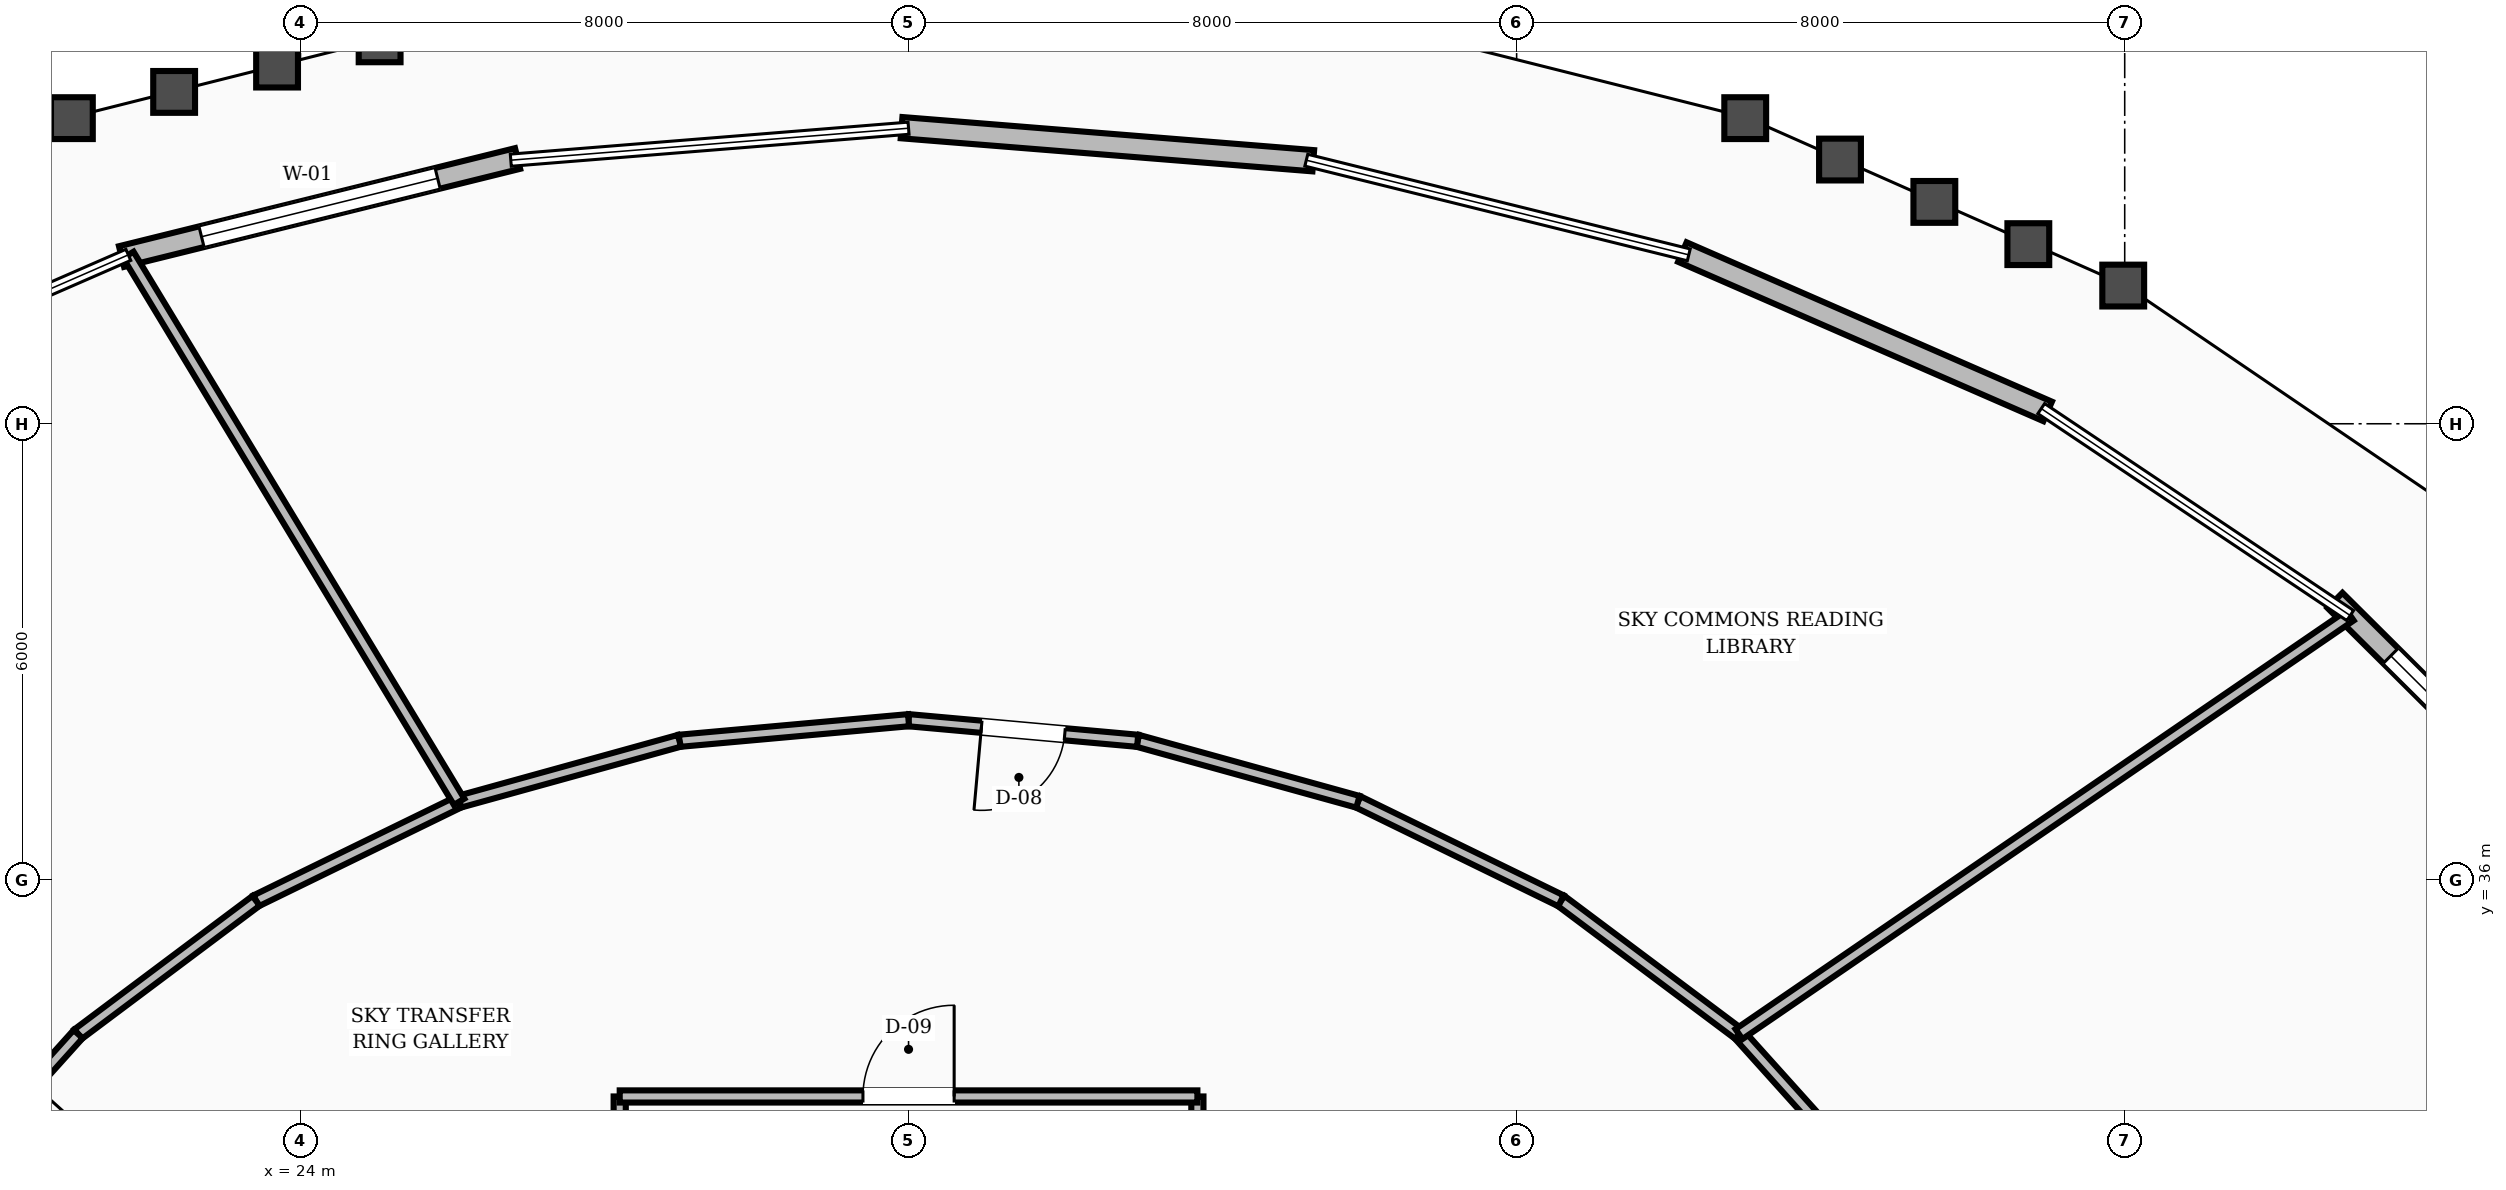
"""IFC4 building model, lengths in metres.
Left out: names, types, materials, properties, quantities, classifications, styles, units other than length and angle.
Written with IfcOpenShell. Run it as: python <this file> out.ifc"""

import sys

from ifc_helpers import new_model, si_unit, direction, frame, frame_2d, origin, place, context, subcontext, project, spatial, rectangle, extrude, element, fill, save


model = new_model("IFC4")
c1 = context("Model", 3, precision=1e-05, world=origin(), true_north=direction((0.0, 1.0)))
c2 = subcontext(c1, "Body", "Model", "MODEL_VIEW")
j1 = project(units=[si_unit("LENGTHUNIT", "METRE"), si_unit("PLANEANGLEUNIT", "RADIAN")], contexts=[c1])
p1 = place(None, origin())
s1 = spatial("IfcSite", under=j1, at=p1, CompositionType="ELEMENT")
p2 = place(p1, origin())
s2 = spatial("IfcBuilding", under=s1, at=p2, CompositionType="ELEMENT")
p3 = place(p2, frame((0.0, 0.0, 106.0)))
s3 = spatial("IfcBuildingStorey", under=s2, at=p3, CompositionType="ELEMENT", Elevation=106.0)
p4 = place(p3, frame((54.487, 35.977, 0.0), z_axis=(0.0, 0.0, 1.0), x_axis=(-0.709127704371, 0.705080065591, 0.0)))
e1 = element("IfcWall", 1, at=p4, inside=s3, PredefinedType="STANDARD", context=c2, shape_type="SweptSolid", body=[
    extrude(rectangle(XDim=5.248, YDim=0.28, at=frame_2d((2.624, 0.0))), origin(), (0.0, 0.0, 1.0), 3.71),
])
p5 = place(p4, frame((1.013, 0.0, 0.8)))
e2 = element("IfcOpeningElement", 2, at=p5, cuts=e1, PredefinedType="OPENING", context=c2, shape_type="SweptSolid", body=[
    extrude(rectangle(XDim=3.2, YDim=1.65, at=frame_2d((1.6, 0.825))), frame((0.0, 0.15, 0.0), z_axis=(0.0, -1.0, 0.0), x_axis=(1.0, 0.0, 0.0)), (0.0, 0.0, 1.0), 0.3),
])
p6 = place(p3, frame((46.986, 42.163, 0.0), z_axis=(0.0, 0.0, 1.0), x_axis=(-0.916604537143, 0.399795100631, 0.0)))
e3 = element("IfcWall", 3, at=p6, inside=s3, PredefinedType="STANDARD", context=c2, shape_type="SweptSolid", body=[
    extrude(rectangle(XDim=5.243, YDim=0.28, at=frame_2d((2.622, 0.0))), origin(), (0.0, 0.0, 1.0), 3.71),
])
p7 = place(p3, frame((37.325, 45.46, 0.0), z_axis=(0.0, 0.0, 1.0), x_axis=(-0.996786212596, 0.080107717347, 0.0)))
e4 = element("IfcWall", 4, at=p7, inside=s3, PredefinedType="STANDARD", context=c2, shape_type="SweptSolid", body=[
    extrude(rectangle(XDim=5.434, YDim=0.28, at=frame_2d((2.717, 0.0))), origin(), (0.0, 0.0, 1.0), 3.71),
])
p8 = place(p3, frame((26.856, 45.49, 0.0), z_axis=(0.0, 0.0, 1.0), x_axis=(-0.9707123559, -0.240244712954, 0.0)))
e5 = element("IfcWall", 5, at=p8, inside=s3, PredefinedType="STANDARD", context=c2, shape_type="SweptSolid", body=[
    extrude(rectangle(XDim=5.368, YDim=0.28, at=frame_2d((2.684, 0.0))), origin(), (0.0, 0.0, 1.0), 3.71),
])
p9 = place(p8, frame((1.084, 0.0, 0.8)))
e6 = element("IfcOpeningElement", 6, at=p9, cuts=e5, PredefinedType="OPENING", context=c2, shape_type="SweptSolid", body=[
    extrude(rectangle(XDim=3.2, YDim=1.65, at=frame_2d((1.6, 0.825))), frame((0.0, 0.15, 0.0), z_axis=(0.0, -1.0, 0.0), x_axis=(1.0, 0.0, 0.0)), (0.0, 0.0, 1.0), 0.3),
])
for number, where, z_axis, x_axis in (
    (7, (28.2, 31.45, 0.0), (0.0, 0.0, 1.0), (0.0, 1.0, 0.0)),
    (8, (35.8, 31.45, 0.0), (0.0, 0.0, 1.0), (0.0, 1.0, 0.0)),
):
    element("IfcWall", number, at=place(p3, frame(where, z_axis=z_axis, x_axis=x_axis)), inside=s3, PredefinedType="SOLIDWALL", context=c2, shape_type="SweptSolid", body=[
        extrude(rectangle(XDim=1.7, YDim=0.16, at=frame_2d((0.85, 0.0))), origin(), (0.0, 0.0, 1.0), 3.71),
    ])
p10 = place(p3, frame((28.2, 33.15, 0.0), z_axis=(0.0, 0.0, 1.0), x_axis=(1.0, 0.0, 0.0)))
e9 = element("IfcWall", 9, at=p10, inside=s3, PredefinedType="SOLIDWALL", context=c2, shape_type="SweptSolid", body=[
    extrude(rectangle(XDim=7.6, YDim=0.16, at=frame_2d((3.8, 0.0))), origin(), (0.0, 0.0, 1.0), 3.71),
])
p11 = place(p10, frame((3.2, 0.0, 0.0)))
e10 = element("IfcOpeningElement", 10, at=p11, cuts=e9, PredefinedType="OPENING", context=c2, shape_type="SweptSolid", body=[
    extrude(rectangle(XDim=1.2, YDim=2.1, at=frame_2d((0.6, 1.05))), frame((0.0, 0.09, 0.0), z_axis=(0.0, -1.0, 0.0), x_axis=(1.0, 0.0, 0.0)), (0.0, 0.0, 1.0), 0.18),
])
p12 = place(p3, frame((44.846, 31.833, 0.0), z_axis=(0.0, 0.0, 1.0), x_axis=(-0.668645478294, 0.743581350194, 0.0)))
e11 = element("IfcWall", 11, at=p12, inside=s3, PredefinedType="SOLIDWALL", context=c2, shape_type="SweptSolid", body=[
    extrude(rectangle(XDim=2.874, YDim=0.16, at=frame_2d((1.437, 0.0))), origin(), (0.0, 0.0, 1.0), 3.71),
])
p13 = place(p3, frame((42.925, 33.97, 0.0), z_axis=(0.0, 0.0, 1.0), x_axis=(-0.800420462314, 0.599438973966, 0.0)))
e12 = element("IfcWall", 12, at=p13, inside=s3, PredefinedType="SOLIDWALL", context=c2, shape_type="SweptSolid", body=[
    extrude(rectangle(XDim=2.925, YDim=0.16, at=frame_2d((1.462, 0.0))), origin(), (0.0, 0.0, 1.0), 3.71),
])
p14 = place(p3, frame((40.583, 35.724, 0.0), z_axis=(0.0, 0.0, 1.0), x_axis=(-0.898755022802, 0.438451147778, 0.0)))
e13 = element("IfcWall", 13, at=p14, inside=s3, PredefinedType="SOLIDWALL", context=c2, shape_type="SweptSolid", body=[
    extrude(rectangle(XDim=2.972, YDim=0.16, at=frame_2d((1.486, 0.0))), origin(), (0.0, 0.0, 1.0), 3.71),
])
p15 = place(p3, frame((37.913, 37.027, 0.0), z_axis=(0.0, 0.0, 1.0), x_axis=(-0.963743190464, 0.26683152519, 0.0)))
e14 = element("IfcWall", 14, at=p15, inside=s3, PredefinedType="SOLIDWALL", context=c2, shape_type="SweptSolid", body=[
    extrude(rectangle(XDim=3.008, YDim=0.16, at=frame_2d((1.504, 0.0))), origin(), (0.0, 0.0, 1.0), 3.71),
])
p16 = place(p3, frame((35.014, 37.829, 0.0), z_axis=(0.0, 0.0, 1.0), x_axis=(-0.995982645158, 0.089546471418, 0.0)))
e15 = element("IfcWall", 15, at=p16, inside=s3, PredefinedType="SOLIDWALL", context=c2, shape_type="SweptSolid", body=[
    extrude(rectangle(XDim=3.026, YDim=0.16, at=frame_2d((1.513, 0.0))), origin(), (0.0, 0.0, 1.0), 3.71),
])
p17 = place(p16, frame((0.963, 0.0, 0.0)))
e16 = element("IfcOpeningElement", 16, at=p17, cuts=e15, PredefinedType="OPENING", context=c2, shape_type="SweptSolid", body=[
    extrude(rectangle(XDim=1.1, YDim=2.1, at=frame_2d((0.55, 1.05))), frame((0.0, 0.09, 0.0), z_axis=(0.0, -1.0, 0.0), x_axis=(1.0, 0.0, 0.0)), (0.0, 0.0, 1.0), 0.18),
])
p18 = place(p3, frame((32.0, 38.1, 0.0), z_axis=(0.0, 0.0, 1.0), x_axis=(-0.995982645158, -0.089546471418, 0.0)))
e17 = element("IfcWall", 17, at=p18, inside=s3, PredefinedType="SOLIDWALL", context=c2, shape_type="SweptSolid", body=[
    extrude(rectangle(XDim=3.026, YDim=0.16, at=frame_2d((1.513, 0.0))), origin(), (0.0, 0.0, 1.0), 3.71),
])
p19 = place(p3, frame((28.986, 37.829, 0.0), z_axis=(0.0, 0.0, 1.0), x_axis=(-0.963743190464, -0.26683152519, 0.0)))
e18 = element("IfcWall", 18, at=p19, inside=s3, PredefinedType="SOLIDWALL", context=c2, shape_type="SweptSolid", body=[
    extrude(rectangle(XDim=3.008, YDim=0.16, at=frame_2d((1.504, 0.0))), origin(), (0.0, 0.0, 1.0), 3.71),
])
p20 = place(p3, frame((26.087, 37.027, 0.0), z_axis=(0.0, 0.0, 1.0), x_axis=(-0.898755022802, -0.438451147778, 0.0)))
e19 = element("IfcWall", 19, at=p20, inside=s3, PredefinedType="SOLIDWALL", context=c2, shape_type="SweptSolid", body=[
    extrude(rectangle(XDim=2.972, YDim=0.16, at=frame_2d((1.486, 0.0))), origin(), (0.0, 0.0, 1.0), 3.71),
])
p21 = place(p3, frame((23.417, 35.724, 0.0), z_axis=(0.0, 0.0, 1.0), x_axis=(-0.800420462314, -0.599438973966, 0.0)))
e20 = element("IfcWall", 20, at=p21, inside=s3, PredefinedType="SOLIDWALL", context=c2, shape_type="SweptSolid", body=[
    extrude(rectangle(XDim=2.925, YDim=0.16, at=frame_2d((1.462, 0.0))), origin(), (0.0, 0.0, 1.0), 3.71),
])
p22 = place(p3, frame((21.075, 33.97, 0.0), z_axis=(0.0, 0.0, 1.0), x_axis=(-0.668645478294, -0.743581350194, 0.0)))
e21 = element("IfcWall", 21, at=p22, inside=s3, PredefinedType="SOLIDWALL", context=c2, shape_type="SweptSolid", body=[
    extrude(rectangle(XDim=2.874, YDim=0.16, at=frame_2d((1.437, 0.0))), origin(), (0.0, 0.0, 1.0), 3.71),
])
p23 = place(p22, frame((0.887, 0.0, 0.0)))
e22 = element("IfcOpeningElement", 22, at=p23, cuts=e21, PredefinedType="OPENING", context=c2, shape_type="SweptSolid", body=[
    extrude(rectangle(XDim=1.1, YDim=2.1, at=frame_2d((0.55, 1.05))), frame((0.0, 0.09, 0.0), z_axis=(0.0, -1.0, 0.0), x_axis=(1.0, 0.0, 0.0)), (0.0, 0.0, 1.0), 0.18),
])
p24 = place(p3, frame((42.925, 33.97, 0.0), z_axis=(0.0, 0.0, 1.0), x_axis=(0.825084174335, 0.56500982758, 0.0)))
e23 = element("IfcWall", 23, at=p24, inside=s3, PredefinedType="SOLIDWALL", context=c2, shape_type="SweptSolid", body=[
    extrude(rectangle(XDim=9.747, YDim=0.16, at=frame_2d((4.874, 0.0))), origin(), (0.0, 0.0, 1.0), 3.71),
])
p25 = place(p3, frame((26.087, 37.027, 0.0), z_axis=(0.0, 0.0, 1.0), x_axis=(-0.517540961526, 0.85565843252, 0.0)))
e24 = element("IfcWall", 24, at=p25, inside=s3, PredefinedType="SOLIDWALL", context=c2, shape_type="SweptSolid", body=[
    extrude(rectangle(XDim=8.409, YDim=0.16, at=frame_2d((4.205, 0.0))), origin(), (0.0, 0.0, 1.0), 3.71),
])
p26 = place(p5, origin())
e25 = element("IfcWindow", 25, at=p26, inside=s3, PartitioningType="SINGLE_PANEL", PredefinedType="WINDOW", context=c2, shape_type="SweptSolid", body=[
    extrude(rectangle(XDim=3.2, YDim=1.65, at=frame_2d((1.6, 0.825))), frame((0.0, 0.03, 0.0), z_axis=(0.0, -1.0, 0.0), x_axis=(1.0, 0.0, 0.0)), (0.0, 0.0, 1.0), 0.06),
])
fill(e2, e25)
p27 = place(p9, origin())
e26 = element("IfcWindow", 26, at=p27, inside=s3, PartitioningType="SINGLE_PANEL", PredefinedType="WINDOW", context=c2, shape_type="SweptSolid", body=[
    extrude(rectangle(XDim=3.2, YDim=1.65, at=frame_2d((1.6, 0.825))), frame((0.0, 0.03, 0.0), z_axis=(0.0, -1.0, 0.0), x_axis=(1.0, 0.0, 0.0)), (0.0, 0.0, 1.0), 0.06),
])
fill(e6, e26)
p28 = place(p11, origin())
e27 = element("IfcDoor", 27, at=p28, inside=s3, OperationType="SINGLE_SWING_RIGHT", PredefinedType="DOOR", context=c2, shape_type="SweptSolid", body=[
    extrude(rectangle(XDim=1.2, YDim=2.1, at=frame_2d((0.6, 1.05))), frame((0.0, 0.025, 0.0), z_axis=(0.0, -1.0, 0.0), x_axis=(1.0, 0.0, 0.0)), (0.0, 0.0, 1.0), 0.05),
])
fill(e10, e27)
p29 = place(p17, origin())
e28 = element("IfcDoor", 28, at=p29, inside=s3, OperationType="SINGLE_SWING_RIGHT", PredefinedType="DOOR", context=c2, shape_type="SweptSolid", body=[
    extrude(rectangle(XDim=1.1, YDim=2.1, at=frame_2d((0.55, 1.05))), frame((0.0, 0.025, 0.0), z_axis=(0.0, -1.0, 0.0), x_axis=(1.0, 0.0, 0.0)), (0.0, 0.0, 1.0), 0.05),
])
fill(e16, e28)
save(model, sys.argv[1])
